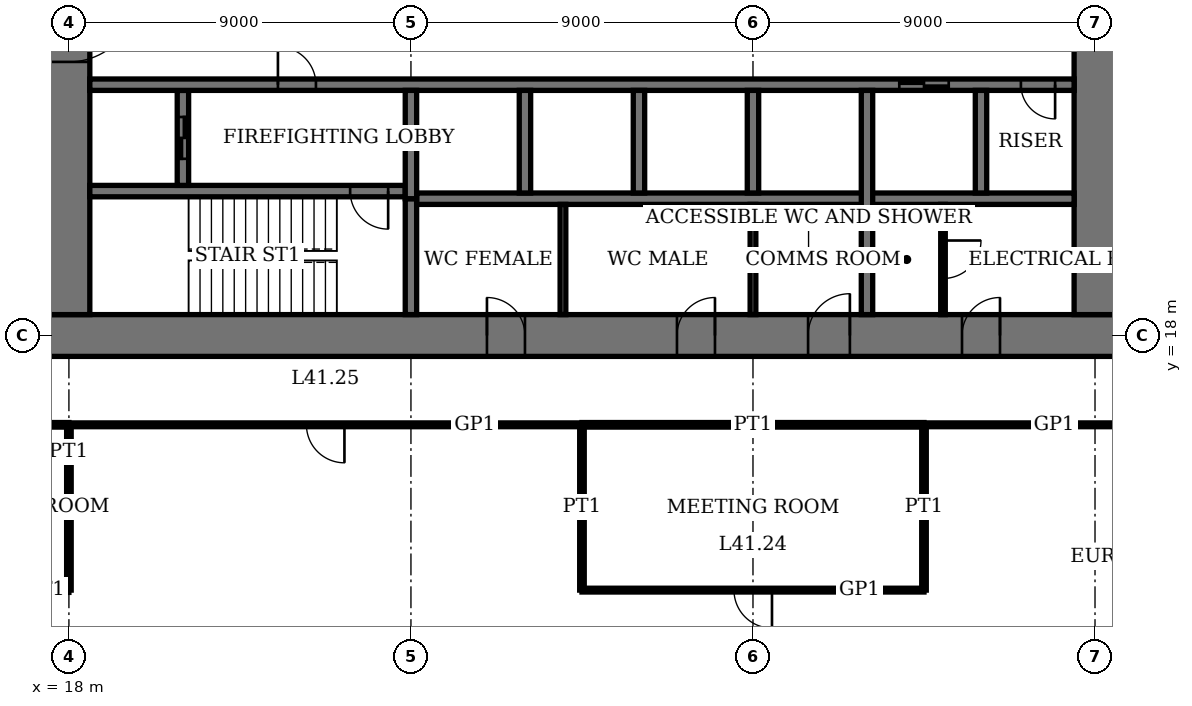
"""IFC4 building model, lengths in metres.
Left out: names, types, materials, properties, quantities, classifications, styles, units other than length and angle.
Written with IfcOpenShell. Run it as: python <this file> out.ifc"""

import sys

from ifc_helpers import new_model, si_unit, direction, frame, frame_2d, origin, place, context, subcontext, project, spatial, rectangle, extrude, element, fill, save


model = new_model("IFC4")
c1 = context("Model", 3, precision=1e-05, world=origin(), true_north=direction((0.0, 1.0)))
c2 = subcontext(c1, "Body", "Model", "MODEL_VIEW")
j1 = project(units=[si_unit("LENGTHUNIT", "METRE"), si_unit("PLANEANGLEUNIT", "RADIAN")], contexts=[c1])
p1 = place(None, origin())
s1 = spatial("IfcSite", under=j1, at=p1, CompositionType="ELEMENT")
p2 = place(p1, origin())
s2 = spatial("IfcBuilding", under=s1, at=p2, CompositionType="ELEMENT")
p3 = place(p2, frame((0.0, 0.0, 170.2)))
s3 = spatial("IfcBuildingStorey", under=s2, at=p3, CompositionType="ELEMENT", Elevation=170.2)
p4 = place(p3, frame((17.45, 18.0, 0.0), z_axis=(0.0, 0.0, 1.0), x_axis=(1.0, 0.0, 0.0)))
e1 = element("IfcWall", 1, at=p4, inside=s3, PredefinedType="SHEAR", context=c2, shape_type="SweptSolid", body=[
    extrude(rectangle(XDim=28.1, YDim=1.1, at=frame_2d((14.05, 0.0))), origin(), (0.0, 0.0, 1.0), 4.0),
])
p5 = place(p4, frame((11.55, 0.0, 0.0)))
e2 = element("IfcOpeningElement", 2, at=p5, cuts=e1, PredefinedType="OPENING", context=c2, shape_type="SweptSolid", body=[
    extrude(rectangle(XDim=1.0, YDim=2.4, at=frame_2d((0.5, 1.2))), frame((0.0, 0.56, 0.0), z_axis=(0.0, -1.0, 0.0), x_axis=(1.0, 0.0, 0.0)), (0.0, 0.0, 1.0), 1.12),
])
p6 = place(p4, frame((16.55, 0.0, 0.0)))
e3 = element("IfcOpeningElement", 3, at=p6, cuts=e1, PredefinedType="OPENING", context=c2, shape_type="SweptSolid", body=[
    extrude(rectangle(XDim=1.0, YDim=2.4, at=frame_2d((0.5, 1.2))), frame((0.0, 0.56, 0.0), z_axis=(0.0, -1.0, 0.0), x_axis=(1.0, 0.0, 0.0)), (0.0, 0.0, 1.0), 1.12),
])
p7 = place(p4, frame((20.0, 0.0, 0.0)))
e4 = element("IfcOpeningElement", 4, at=p7, cuts=e1, PredefinedType="OPENING", context=c2, shape_type="SweptSolid", body=[
    extrude(rectangle(XDim=1.1, YDim=2.4, at=frame_2d((0.55, 1.2))), frame((0.0, 0.56, 0.0), z_axis=(0.0, -1.0, 0.0), x_axis=(1.0, 0.0, 0.0)), (0.0, 0.0, 1.0), 1.12),
])
p8 = place(p4, frame((24.05, 0.0, 0.0)))
e5 = element("IfcOpeningElement", 5, at=p8, cuts=e1, PredefinedType="OPENING", context=c2, shape_type="SweptSolid", body=[
    extrude(rectangle(XDim=1.0, YDim=2.4, at=frame_2d((0.5, 1.2))), frame((0.0, 0.56, 0.0), z_axis=(0.0, -1.0, 0.0), x_axis=(1.0, 0.0, 0.0)), (0.0, 0.0, 1.0), 1.12),
])
p9 = place(p3, frame((18.0, 35.45, 0.0), z_axis=(0.0, 0.0, 1.0), x_axis=(0.0, -1.0, 0.0)))
e6 = element("IfcWall", 6, at=p9, inside=s3, PredefinedType="SHEAR", context=c2, shape_type="SweptSolid", body=[
    extrude(rectangle(XDim=16.9, YDim=1.1, at=frame_2d((8.45, 0.0))), origin(), (0.0, 0.0, 1.0), 4.0),
])
p10 = place(p9, frame((8.45, 0.0, 0.0)))
e7 = element("IfcOpeningElement", 7, at=p10, cuts=e6, PredefinedType="OPENING", context=c2, shape_type="SweptSolid", body=[
    extrude(rectangle(XDim=1.8, YDim=2.4, at=frame_2d((0.9, 1.2))), frame((0.0, 0.56, 0.0), z_axis=(0.0, -1.0, 0.0), x_axis=(1.0, 0.0, 0.0)), (0.0, 0.0, 1.0), 1.12),
])
p11 = place(p3, frame((45.0, 18.55, 0.0), z_axis=(0.0, 0.0, 1.0), x_axis=(0.0, 1.0, 0.0)))
e8 = element("IfcWall", 8, at=p11, inside=s3, PredefinedType="SHEAR", context=c2, shape_type="SweptSolid", body=[
    extrude(rectangle(XDim=16.9, YDim=1.1, at=frame_2d((8.45, 0.0))), origin(), (0.0, 0.0, 1.0), 4.0),
])
p12 = place(p11, frame((8.45, 0.0, 0.0)))
e9 = element("IfcOpeningElement", 9, at=p12, cuts=e8, PredefinedType="OPENING", context=c2, shape_type="SweptSolid", body=[
    extrude(rectangle(XDim=1.8, YDim=2.4, at=frame_2d((0.9, 1.2))), frame((0.0, 0.56, 0.0), z_axis=(0.0, -1.0, 0.0), x_axis=(1.0, 0.0, 0.0)), (0.0, 0.0, 1.0), 1.12),
])
p13 = place(p3, frame((18.55, 21.8, 0.0), z_axis=(0.0, 0.0, 1.0), x_axis=(1.0, 0.0, 0.0)))
e10 = element("IfcWall", 10, at=p13, inside=s3, PredefinedType="SHEAR", context=c2, shape_type="SweptSolid", body=[
    extrude(rectangle(XDim=8.3, YDim=0.3, at=frame_2d((4.15, 0.0))), origin(), (0.0, 0.0, 1.0), 4.0),
])
p14 = place(p13, frame((6.85, 0.0, 0.0)))
e11 = element("IfcOpeningElement", 11, at=p14, cuts=e10, PredefinedType="OPENING", context=c2, shape_type="SweptSolid", body=[
    extrude(rectangle(XDim=1.0, YDim=2.4, at=frame_2d((0.5, 1.2))), frame((0.0, 0.16, 0.0), z_axis=(0.0, -1.0, 0.0), x_axis=(1.0, 0.0, 0.0)), (0.0, 0.0, 1.0), 0.32),
])
p15 = place(p3, frame((27.0, 18.55, 0.0), z_axis=(0.0, 0.0, 1.0), x_axis=(0.0, 1.0, 0.0)))
e12 = element("IfcWall", 12, at=p15, inside=s3, PredefinedType="SHEAR", context=c2, shape_type="SweptSolid", body=[
    extrude(rectangle(XDim=3.05, YDim=0.3, at=frame_2d((1.525, 0.0))), origin(), (0.0, 0.0, 1.0), 4.0),
])
p16 = place(p3, frame((21.0, 21.95, 0.0), z_axis=(0.0, 0.0, 1.0), x_axis=(0.0, 1.0, 0.0)))
e13 = element("IfcWall", 13, at=p16, inside=s3, PredefinedType="SHEAR", context=c2, shape_type="SweptSolid", body=[
    extrude(rectangle(XDim=2.5, YDim=0.3, at=frame_2d((1.25, 0.0))), origin(), (0.0, 0.0, 1.0), 4.0),
])
p17 = place(p16, frame((0.7, 0.0, 0.0)))
e14 = element("IfcOpeningElement", 14, at=p17, cuts=e13, PredefinedType="OPENING", context=c2, shape_type="SweptSolid", body=[
    extrude(rectangle(XDim=1.1, YDim=2.4, at=frame_2d((0.55, 1.2))), frame((0.0, 0.16, 0.0), z_axis=(0.0, -1.0, 0.0), x_axis=(1.0, 0.0, 0.0)), (0.0, 0.0, 1.0), 0.32),
])
p18 = place(p3, frame((18.55, 24.6, 0.0), z_axis=(0.0, 0.0, 1.0), x_axis=(1.0, 0.0, 0.0)))
e15 = element("IfcWall", 15, at=p18, inside=s3, PredefinedType="SHEAR", context=c2, shape_type="SweptSolid", body=[
    extrude(rectangle(XDim=25.9, YDim=0.3, at=frame_2d((12.95, 0.0))), origin(), (0.0, 0.0, 1.0), 4.0),
])
p19 = place(p18, frame((4.95, 0.0, 0.0)))
e16 = element("IfcOpeningElement", 16, at=p19, cuts=e15, PredefinedType="OPENING", context=c2, shape_type="SweptSolid", body=[
    extrude(rectangle(XDim=1.0, YDim=2.4, at=frame_2d((0.5, 1.2))), frame((0.0, 0.16, 0.0), z_axis=(0.0, -1.0, 0.0), x_axis=(1.0, 0.0, 0.0)), (0.0, 0.0, 1.0), 0.32),
])
p20 = place(p18, frame((24.5, 0.0, 0.0)))
e17 = element("IfcOpeningElement", 17, at=p20, cuts=e15, PredefinedType="OPENING", context=c2, shape_type="SweptSolid", body=[
    extrude(rectangle(XDim=0.9, YDim=2.1, at=frame_2d((0.45, 1.05))), frame((0.0, 0.16, 0.0), z_axis=(0.0, -1.0, 0.0), x_axis=(1.0, 0.0, 0.0)), (0.0, 0.0, 1.0), 0.32),
])
p21 = place(p18, frame((21.3, 0.0, 0.0)))
e18 = element("IfcOpeningElement", 18, at=p21, cuts=e15, PredefinedType="OPENING", context=c2, shape_type="SweptSolid", body=[
    extrude(rectangle(XDim=1.3, YDim=2.4, at=frame_2d((0.65, 1.2))), frame((0.0, 0.16, 0.0), z_axis=(0.0, -1.0, 0.0), x_axis=(1.0, 0.0, 0.0)), (0.0, 0.0, 1.0), 0.32),
])
p22 = place(p3, frame((27.15, 21.6, 0.0), z_axis=(0.0, 0.0, 1.0), x_axis=(1.0, 0.0, 0.0)))
e19 = element("IfcWall", 19, at=p22, inside=s3, PredefinedType="SHEAR", context=c2, shape_type="SweptSolid", body=[
    extrude(rectangle(XDim=17.3, YDim=0.3, at=frame_2d((8.65, 0.0))), origin(), (0.0, 0.0, 1.0), 4.0),
])
for number, where, z_axis, x_axis in (
    (20, (30.0, 21.75, 0.0), (0.0, 0.0, 1.0), (0.0, 1.0, 0.0)),
    (21, (33.0, 21.75, 0.0), (0.0, 0.0, 1.0), (0.0, 1.0, 0.0)),
    (22, (36.0, 21.75, 0.0), (0.0, 0.0, 1.0), (0.0, 1.0, 0.0)),
):
    element("IfcWall", number, at=place(p3, frame(where, z_axis=z_axis, x_axis=x_axis)), inside=s3, PredefinedType="SHEAR", context=c2, shape_type="SweptSolid", body=[
        extrude(rectangle(XDim=2.7, YDim=0.3, at=frame_2d((1.35, 0.0))), origin(), (0.0, 0.0, 1.0), 4.0),
    ])
p23 = place(p3, frame((39.0, 18.55, 0.0), z_axis=(0.0, 0.0, 1.0), x_axis=(0.0, 1.0, 0.0)))
e23 = element("IfcWall", 23, at=p23, inside=s3, PredefinedType="SHEAR", context=c2, shape_type="SweptSolid", body=[
    extrude(rectangle(XDim=5.9, YDim=0.3, at=frame_2d((2.95, 0.0))), origin(), (0.0, 0.0, 1.0), 4.0),
])
p24 = place(p3, frame((42.0, 21.75, 0.0), z_axis=(0.0, 0.0, 1.0), x_axis=(0.0, 1.0, 0.0)))
e24 = element("IfcWall", 24, at=p24, inside=s3, PredefinedType="SHEAR", context=c2, shape_type="SweptSolid", body=[
    extrude(rectangle(XDim=2.7, YDim=0.3, at=frame_2d((1.35, 0.0))), origin(), (0.0, 0.0, 1.0), 4.0),
])
p25 = place(p3, frame((27.0, 21.6, 0.0), z_axis=(0.0, 0.0, 1.0), x_axis=(0.0, 1.0, 0.0)))
e25 = element("IfcWall", 25, at=p25, inside=s3, PredefinedType="SHEAR", context=c2, shape_type="SweptSolid", body=[
    extrude(rectangle(XDim=2.85, YDim=0.3, at=frame_2d((1.425, 0.0))), origin(), (0.0, 0.0, 1.0), 4.0),
])
p26 = place(p3, frame((13.5, 11.3, 0.0), z_axis=(0.0, 0.0, 1.0), x_axis=(1.0, 0.0, 0.0)))
e26 = element("IfcWall", 26, at=p26, inside=s3, PredefinedType="PARTITIONING", context=c2, shape_type="SweptSolid", body=[
    extrude(rectangle(XDim=4.5, YDim=0.12, at=frame_2d((2.25, 0.0))), origin(), (0.0, 0.0, 1.0), 3.75),
])
p27 = place(p26, frame((1.75, 0.0, 0.0)))
e27 = element("IfcOpeningElement", 27, at=p27, cuts=e26, PredefinedType="OPENING", context=c2, shape_type="SweptSolid", body=[
    extrude(rectangle(XDim=1.0, YDim=2.4, at=frame_2d((0.5, 1.2))), frame((0.0, 0.07, 0.0), z_axis=(0.0, -1.0, 0.0), x_axis=(1.0, 0.0, 0.0)), (0.0, 0.0, 1.0), 0.14),
])
p28 = place(p3, frame((31.5, 11.3, 0.0), z_axis=(0.0, 0.0, 1.0), x_axis=(1.0, 0.0, 0.0)))
e28 = element("IfcWall", 28, at=p28, inside=s3, PredefinedType="PARTITIONING", context=c2, shape_type="SweptSolid", body=[
    extrude(rectangle(XDim=9.0, YDim=0.1, at=frame_2d((4.5, 0.0))), origin(), (0.0, 0.0, 1.0), 3.75),
])
p29 = place(p28, frame((4.0, 0.0, 0.0)))
e29 = element("IfcOpeningElement", 29, at=p29, cuts=e28, PredefinedType="OPENING", context=c2, shape_type="SweptSolid", body=[
    extrude(rectangle(XDim=1.0, YDim=2.4, at=frame_2d((0.5, 1.2))), frame((0.0, 0.06, 0.0), z_axis=(0.0, -1.0, 0.0), x_axis=(1.0, 0.0, 0.0)), (0.0, 0.0, 1.0), 0.12),
])
p30 = place(p3, frame((31.5, 15.65, 0.0), z_axis=(0.0, 0.0, 1.0), x_axis=(1.0, 0.0, 0.0)))
e30 = element("IfcWall", 30, at=p30, inside=s3, PredefinedType="PARTITIONING", context=c2, shape_type="SweptSolid", body=[
    extrude(rectangle(XDim=9.0, YDim=0.12, at=frame_2d((4.5, 0.0))), origin(), (0.0, 0.0, 1.0), 3.75),
])
p31 = place(p3, frame((13.5, 15.65, 0.0), z_axis=(0.0, 0.0, 1.0), x_axis=(1.0, 0.0, 0.0)))
e31 = element("IfcWall", 31, at=p31, inside=s3, PredefinedType="PARTITIONING", context=c2, shape_type="SweptSolid", body=[
    extrude(rectangle(XDim=4.5, YDim=0.12, at=frame_2d((2.25, 0.0))), origin(), (0.0, 0.0, 1.0), 3.75),
])
p32 = place(p3, frame((18.0, 15.65, 0.0), z_axis=(0.0, 0.0, 1.0), x_axis=(1.0, 0.0, 0.0)))
e32 = element("IfcWall", 32, at=p32, inside=s3, PredefinedType="PARTITIONING", context=c2, shape_type="SweptSolid", body=[
    extrude(rectangle(XDim=13.5, YDim=0.1, at=frame_2d((6.75, 0.0))), origin(), (0.0, 0.0, 1.0), 3.75),
])
p33 = place(p32, frame((6.25, 0.0, 0.0)))
e33 = element("IfcOpeningElement", 33, at=p33, cuts=e32, PredefinedType="OPENING", context=c2, shape_type="SweptSolid", body=[
    extrude(rectangle(XDim=1.0, YDim=2.4, at=frame_2d((0.5, 1.2))), frame((0.0, 0.06, 0.0), z_axis=(0.0, -1.0, 0.0), x_axis=(1.0, 0.0, 0.0)), (0.0, 0.0, 1.0), 0.12),
])
p34 = place(p3, frame((40.5, 15.65, 0.0), z_axis=(0.0, 0.0, 1.0), x_axis=(1.0, 0.0, 0.0)))
e34 = element("IfcWall", 34, at=p34, inside=s3, PredefinedType="PARTITIONING", context=c2, shape_type="SweptSolid", body=[
    extrude(rectangle(XDim=6.85, YDim=0.1, at=frame_2d((3.425, 0.0))), origin(), (0.0, 0.0, 1.0), 3.75),
])
p35 = place(p3, frame((18.0, 11.3, 0.0), z_axis=(0.0, 0.0, 1.0), x_axis=(0.0, 1.0, 0.0)))
e35 = element("IfcWall", 35, at=p35, inside=s3, PredefinedType="PARTITIONING", context=c2, shape_type="SweptSolid", body=[
    extrude(rectangle(XDim=4.35, YDim=0.12, at=frame_2d((2.175, 0.0))), origin(), (0.0, 0.0, 1.0), 3.05),
])
for number, where, z_axis, x_axis in (
    (36, (31.5, 11.3, 0.0), (0.0, 0.0, 1.0), (0.0, 1.0, 0.0)),
    (37, (40.5, 11.3, 0.0), (0.0, 0.0, 1.0), (0.0, 1.0, 0.0)),
):
    element("IfcWall", number, at=place(p3, frame(where, z_axis=z_axis, x_axis=x_axis)), inside=s3, PredefinedType="PARTITIONING", context=c2, shape_type="SweptSolid", body=[
        extrude(rectangle(XDim=4.35, YDim=0.12, at=frame_2d((2.175, 0.0))), origin(), (0.0, 0.0, 1.0), 3.75),
    ])
for number, where, z_axis, x_axis in (
    (38, (31.0, 18.55, 0.0), (0.0, 0.0, 1.0), (0.0, 1.0, 0.0)),
    (39, (36.0, 18.55, 0.0), (0.0, 0.0, 1.0), (0.0, 1.0, 0.0)),
):
    element("IfcWall", number, at=place(p3, frame(where, z_axis=z_axis, x_axis=x_axis)), inside=s3, PredefinedType="PARTITIONING", context=c2, shape_type="SweptSolid", body=[
        extrude(rectangle(XDim=2.9, YDim=0.15, at=frame_2d((1.45, 0.0))), origin(), (0.0, 0.0, 1.0), 3.75),
    ])
p36 = place(p3, frame((41.0, 18.55, 0.0), z_axis=(0.0, 0.0, 1.0), x_axis=(0.0, 1.0, 0.0)))
e40 = element("IfcWall", 40, at=p36, inside=s3, PredefinedType="PARTITIONING", context=c2, shape_type="SweptSolid", body=[
    extrude(rectangle(XDim=2.9, YDim=0.12, at=frame_2d((1.45, 0.0))), origin(), (0.0, 0.0, 1.0), 3.75),
])
p37 = place(p36, frame((0.95, 0.0, 0.0)))
e41 = element("IfcOpeningElement", 41, at=p37, cuts=e40, PredefinedType="OPENING", context=c2, shape_type="SweptSolid", body=[
    extrude(rectangle(XDim=1.0, YDim=2.4, at=frame_2d((0.5, 1.2))), frame((0.0, 0.07, 0.0), z_axis=(0.0, -1.0, 0.0), x_axis=(1.0, 0.0, 0.0)), (0.0, 0.0, 1.0), 0.14),
])
p38 = place(p10, origin())
e42 = element("IfcDoor", 42, at=p38, inside=s3, OperationType="DOUBLE_DOOR_DOUBLE_SWING", PredefinedType="DOOR", context=c2, shape_type="SweptSolid", body=[
    extrude(rectangle(XDim=1.8, YDim=2.4, at=frame_2d((0.9, 1.2))), frame((0.0, 0.03, 0.0), z_axis=(0.0, -1.0, 0.0), x_axis=(1.0, 0.0, 0.0)), (0.0, 0.0, 1.0), 0.06),
    extrude(rectangle(XDim=0.04, YDim=2.4, at=frame_2d((0.02, 1.2))), frame((0.0, 0.55, 0.0), z_axis=(0.0, -1.0, 0.0), x_axis=(1.0, 0.0, 0.0)), (0.0, 0.0, 1.0), 1.1),
    extrude(rectangle(XDim=0.04, YDim=2.4, at=frame_2d((1.78, 1.2))), frame((0.0, 0.55, 0.0), z_axis=(0.0, -1.0, 0.0), x_axis=(1.0, 0.0, 0.0)), (0.0, 0.0, 1.0), 1.1),
    extrude(rectangle(XDim=1.8, YDim=0.04, at=frame_2d((0.9, 2.38))), frame((0.0, 0.55, 0.0), z_axis=(0.0, -1.0, 0.0), x_axis=(1.0, 0.0, 0.0)), (0.0, 0.0, 1.0), 1.1),
])
fill(e7, e42)
p39 = place(p5, origin())
e43 = element("IfcDoor", 43, at=p39, inside=s3, OperationType="SINGLE_SWING_RIGHT", PredefinedType="DOOR", context=c2, shape_type="SweptSolid", body=[
    extrude(rectangle(XDim=1.0, YDim=2.4, at=frame_2d((0.5, 1.2))), frame((0.0, 0.025, 0.0), z_axis=(0.0, -1.0, 0.0), x_axis=(1.0, 0.0, 0.0)), (0.0, 0.0, 1.0), 0.05),
    extrude(rectangle(XDim=0.04, YDim=2.4, at=frame_2d((0.02, 1.2))), frame((0.0, 0.4, 0.0), z_axis=(0.0, -1.0, 0.0), x_axis=(1.0, 0.0, 0.0)), (0.0, 0.0, 1.0), 0.8),
    extrude(rectangle(XDim=0.04, YDim=2.4, at=frame_2d((0.98, 1.2))), frame((0.0, 0.4, 0.0), z_axis=(0.0, -1.0, 0.0), x_axis=(1.0, 0.0, 0.0)), (0.0, 0.0, 1.0), 0.8),
    extrude(rectangle(XDim=1.0, YDim=0.04, at=frame_2d((0.5, 2.38))), frame((0.0, 0.4, 0.0), z_axis=(0.0, -1.0, 0.0), x_axis=(1.0, 0.0, 0.0)), (0.0, 0.0, 1.0), 0.8),
])
fill(e2, e43)
p40 = place(p6, origin())
e44 = element("IfcDoor", 44, at=p40, inside=s3, OperationType="SINGLE_SWING_LEFT", PredefinedType="DOOR", context=c2, shape_type="SweptSolid", body=[
    extrude(rectangle(XDim=1.0, YDim=2.4, at=frame_2d((0.5, 1.2))), frame((0.0, 0.025, 0.0), z_axis=(0.0, -1.0, 0.0), x_axis=(1.0, 0.0, 0.0)), (0.0, 0.0, 1.0), 0.05),
    extrude(rectangle(XDim=0.04, YDim=2.4, at=frame_2d((0.02, 1.2))), frame((0.0, 0.4, 0.0), z_axis=(0.0, -1.0, 0.0), x_axis=(1.0, 0.0, 0.0)), (0.0, 0.0, 1.0), 0.8),
    extrude(rectangle(XDim=0.04, YDim=2.4, at=frame_2d((0.98, 1.2))), frame((0.0, 0.4, 0.0), z_axis=(0.0, -1.0, 0.0), x_axis=(1.0, 0.0, 0.0)), (0.0, 0.0, 1.0), 0.8),
    extrude(rectangle(XDim=1.0, YDim=0.04, at=frame_2d((0.5, 2.38))), frame((0.0, 0.4, 0.0), z_axis=(0.0, -1.0, 0.0), x_axis=(1.0, 0.0, 0.0)), (0.0, 0.0, 1.0), 0.8),
])
fill(e3, e44)
p41 = place(p7, origin())
e45 = element("IfcDoor", 45, at=p41, inside=s3, OperationType="SINGLE_SWING_LEFT", PredefinedType="DOOR", context=c2, shape_type="SweptSolid", body=[
    extrude(rectangle(XDim=1.1, YDim=2.4, at=frame_2d((0.55, 1.2))), frame((0.0, 0.025, 0.0), z_axis=(0.0, -1.0, 0.0), x_axis=(1.0, 0.0, 0.0)), (0.0, 0.0, 1.0), 0.05),
    extrude(rectangle(XDim=0.04, YDim=2.4, at=frame_2d((0.02, 1.2))), frame((0.0, 0.44, 0.0), z_axis=(0.0, -1.0, 0.0), x_axis=(1.0, 0.0, 0.0)), (0.0, 0.0, 1.0), 0.88),
    extrude(rectangle(XDim=0.04, YDim=2.4, at=frame_2d((1.08, 1.2))), frame((0.0, 0.44, 0.0), z_axis=(0.0, -1.0, 0.0), x_axis=(1.0, 0.0, 0.0)), (0.0, 0.0, 1.0), 0.88),
    extrude(rectangle(XDim=1.1, YDim=0.04, at=frame_2d((0.55, 2.38))), frame((0.0, 0.44, 0.0), z_axis=(0.0, -1.0, 0.0), x_axis=(1.0, 0.0, 0.0)), (0.0, 0.0, 1.0), 0.88),
])
fill(e4, e45)
p42 = place(p8, origin())
e46 = element("IfcDoor", 46, at=p42, inside=s3, OperationType="SINGLE_SWING_LEFT", PredefinedType="DOOR", context=c2, shape_type="SweptSolid", body=[
    extrude(rectangle(XDim=1.0, YDim=2.4, at=frame_2d((0.5, 1.2))), frame((0.0, 0.025, 0.0), z_axis=(0.0, -1.0, 0.0), x_axis=(1.0, 0.0, 0.0)), (0.0, 0.0, 1.0), 0.05),
    extrude(rectangle(XDim=0.04, YDim=2.4, at=frame_2d((0.02, 1.2))), frame((0.0, 0.4, 0.0), z_axis=(0.0, -1.0, 0.0), x_axis=(1.0, 0.0, 0.0)), (0.0, 0.0, 1.0), 0.8),
    extrude(rectangle(XDim=0.04, YDim=2.4, at=frame_2d((0.98, 1.2))), frame((0.0, 0.4, 0.0), z_axis=(0.0, -1.0, 0.0), x_axis=(1.0, 0.0, 0.0)), (0.0, 0.0, 1.0), 0.8),
    extrude(rectangle(XDim=1.0, YDim=0.04, at=frame_2d((0.5, 2.38))), frame((0.0, 0.4, 0.0), z_axis=(0.0, -1.0, 0.0), x_axis=(1.0, 0.0, 0.0)), (0.0, 0.0, 1.0), 0.8),
])
fill(e5, e46)
p43 = place(p14, origin())
e47 = element("IfcDoor", 47, at=p43, inside=s3, OperationType="SINGLE_SWING_RIGHT", PredefinedType="DOOR", context=c2, shape_type="SweptSolid", body=[
    extrude(rectangle(XDim=1.0, YDim=2.4, at=frame_2d((0.5, 1.2))), frame((0.0, 0.03, 0.0), z_axis=(0.0, -1.0, 0.0), x_axis=(1.0, 0.0, 0.0)), (0.0, 0.0, 1.0), 0.06),
])
fill(e11, e47)
p44 = place(p19, origin())
e48 = element("IfcDoor", 48, at=p44, inside=s3, OperationType="SINGLE_SWING_RIGHT", PredefinedType="DOOR", context=c2, shape_type="SweptSolid", body=[
    extrude(rectangle(XDim=1.0, YDim=2.4, at=frame_2d((0.5, 1.2))), frame((0.0, 0.03, 0.0), z_axis=(0.0, -1.0, 0.0), x_axis=(1.0, 0.0, 0.0)), (0.0, 0.0, 1.0), 0.06),
])
fill(e16, e48)
p45 = place(p20, origin())
e49 = element("IfcDoor", 49, at=p45, inside=s3, OperationType="SINGLE_SWING_RIGHT", PredefinedType="DOOR", context=c2, shape_type="SweptSolid", body=[
    extrude(rectangle(XDim=0.9, YDim=2.1, at=frame_2d((0.45, 1.05))), frame((0.0, 0.03, 0.0), z_axis=(0.0, -1.0, 0.0), x_axis=(1.0, 0.0, 0.0)), (0.0, 0.0, 1.0), 0.06),
])
fill(e17, e49)
p46 = place(p29, origin())
e50 = element("IfcDoor", 50, at=p46, inside=s3, OperationType="SINGLE_SWING_RIGHT", PredefinedType="DOOR", context=c2, shape_type="SweptSolid", body=[
    extrude(rectangle(XDim=1.0, YDim=2.4, at=frame_2d((0.5, 1.2))), frame((0.0, 0.02, 0.0), z_axis=(0.0, -1.0, 0.0), x_axis=(1.0, 0.0, 0.0)), (0.0, 0.0, 1.0), 0.04),
])
fill(e29, e50)
p47 = place(p33, origin())
e51 = element("IfcDoor", 51, at=p47, inside=s3, OperationType="SINGLE_SWING_RIGHT", PredefinedType="DOOR", context=c2, shape_type="SweptSolid", body=[
    extrude(rectangle(XDim=1.0, YDim=2.4, at=frame_2d((0.5, 1.2))), frame((0.0, 0.02, 0.0), z_axis=(0.0, -1.0, 0.0), x_axis=(1.0, 0.0, 0.0)), (0.0, 0.0, 1.0), 0.04),
])
fill(e33, e51)
p48 = place(p37, origin())
e52 = element("IfcDoor", 52, at=p48, inside=s3, OperationType="SINGLE_SWING_RIGHT", PredefinedType="DOOR", context=c2, shape_type="SweptSolid", body=[
    extrude(rectangle(XDim=1.0, YDim=2.4, at=frame_2d((0.5, 1.2))), frame((0.0, 0.03, 0.0), z_axis=(0.0, -1.0, 0.0), x_axis=(1.0, 0.0, 0.0)), (0.0, 0.0, 1.0), 0.06),
])
fill(e41, e52)
p49 = place(p21, origin())
e53 = element("IfcDoor", 53, at=p49, inside=s3, OperationType="DOUBLE_DOOR_SLIDING", PredefinedType="DOOR", context=c2, shape_type="SweptSolid", body=[
    extrude(rectangle(XDim=1.3, YDim=2.4, at=frame_2d((0.65, 1.2))), frame((0.0, 0.02, 0.0), z_axis=(0.0, -1.0, 0.0), x_axis=(1.0, 0.0, 0.0)), (0.0, 0.0, 1.0), 0.04),
])
fill(e18, e53)
p50 = place(p17, origin())
e54 = element("IfcDoor", 54, at=p50, inside=s3, OperationType="DOUBLE_DOOR_SLIDING", PredefinedType="DOOR", context=c2, shape_type="SweptSolid", body=[
    extrude(rectangle(XDim=1.1, YDim=2.4, at=frame_2d((0.55, 1.2))), frame((0.0, 0.03, 0.0), z_axis=(0.0, -1.0, 0.0), x_axis=(1.0, 0.0, 0.0)), (0.0, 0.0, 1.0), 0.06),
])
fill(e14, e54)
save(model, sys.argv[1])
